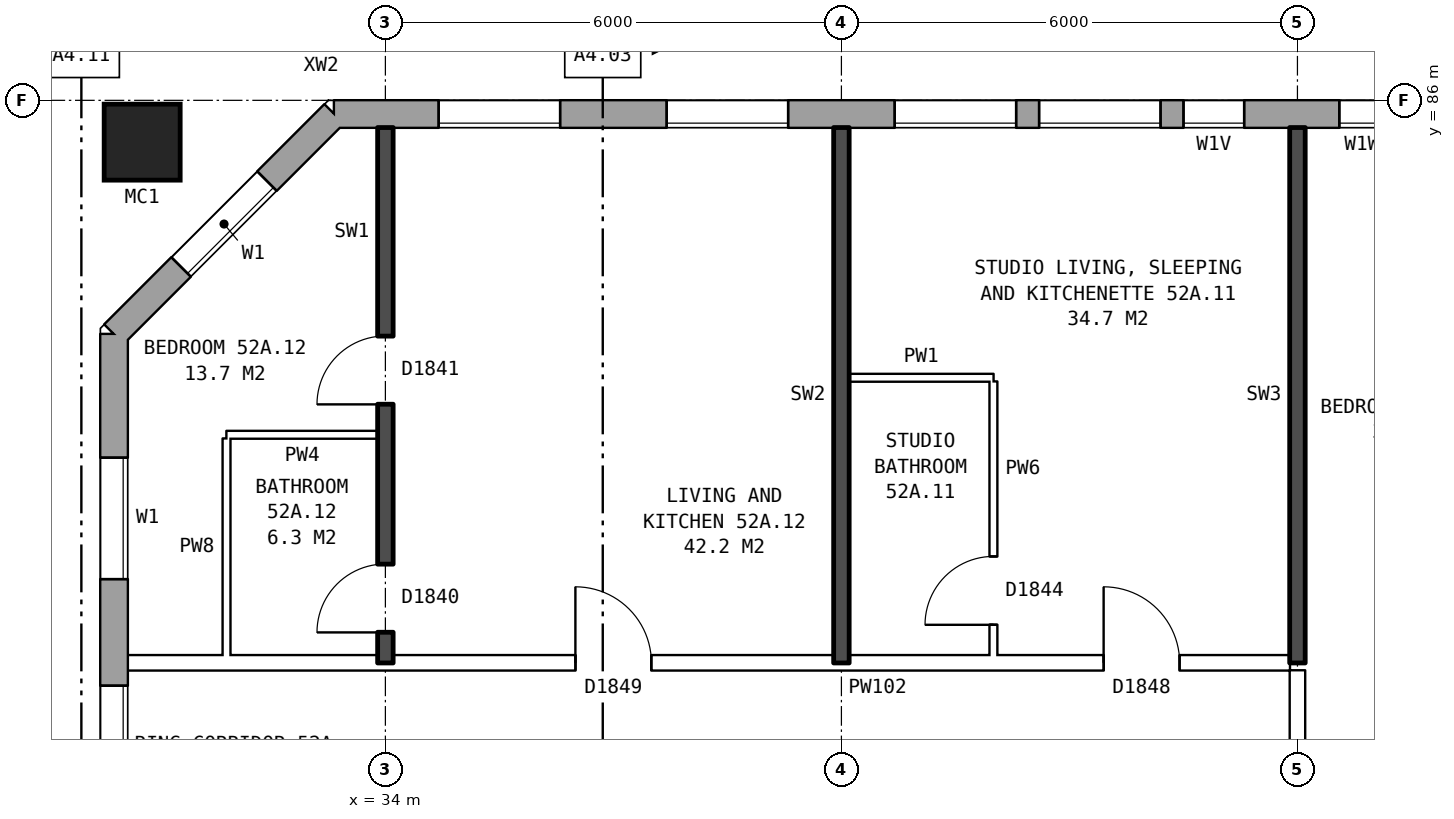
"""IFC4 building model, lengths in metres.
Left out: names, types, materials, properties, quantities, classifications, styles, units other than length and angle.
Written with IfcOpenShell. Run it as: python <this file> out.ifc"""

import sys

from ifc_helpers import new_model, si_unit, direction, frame, frame_2d, origin, origin_2d, place, context, subcontext, project, spatial, rectangle, hollow_rectangle, extrude, element, fill, save


model = new_model("IFC4")
c1 = context("Model", 3, precision=1e-05, world=origin(), true_north=direction((0.0, 1.0)))
c2 = subcontext(c1, "Body", "Model", "MODEL_VIEW")
j1 = project(units=[si_unit("LENGTHUNIT", "METRE"), si_unit("PLANEANGLEUNIT", "RADIAN")], contexts=[c1])
p1 = place(None, origin())
s1 = spatial("IfcSite", under=j1, at=p1, CompositionType="ELEMENT")
p2 = place(p1, origin())
s2 = spatial("IfcBuilding", under=s1, at=p2, CompositionType="ELEMENT")
p3 = place(p2, frame((0.0, 0.0, 185.1)))
s3 = spatial("IfcBuildingStorey", under=s2, at=p3, CompositionType="ELEMENT", Elevation=185.1)
p4 = place(p3, frame((30.8, 85.45, 0.0), z_axis=(0.0, 0.0, 1.0), x_axis=(1.0, 0.0, 0.0)))
e1 = element("IfcColumn", 1, at=p4, inside=s3, PredefinedType="COLUMN", context=c2, shape_type="SweptSolid", body=[
    extrude(hollow_rectangle(XDim=1.0, YDim=1.0, WallThickness=0.055, at=origin_2d()), origin(), (0.0, 0.0, 1.0), 3.1),
])
p5 = place(p3, frame((72.925, 85.82, 0.0), z_axis=(0.0, 0.0, 1.0), x_axis=(-1.0, 0.0, 0.0)))
e2 = element("IfcWall", 2, at=p5, inside=s3, PredefinedType="STANDARD", context=c2, shape_type="SweptSolid", body=[
    extrude(rectangle(XDim=39.601, YDim=0.36, at=frame_2d((19.8, 0.0))), origin(), (0.0, 0.0, 1.0), 2.85),
])
p6 = place(p5, frame((0.625, 0.0, 0.8)))
e3 = element("IfcOpeningElement", 3, at=p6, cuts=e2, PredefinedType="OPENING", context=c2, shape_type="SweptSolid", body=[
    extrude(rectangle(XDim=1.6, YDim=1.8, at=frame_2d((0.8, 0.9))), frame((0.0, 0.19, 0.0), z_axis=(0.0, -1.0, 0.0), x_axis=(1.0, 0.0, 0.0)), (0.0, 0.0, 1.0), 0.38),
])
p7 = place(p5, frame((3.625, 0.0, 0.8)))
e4 = element("IfcOpeningElement", 4, at=p7, cuts=e2, PredefinedType="OPENING", context=c2, shape_type="SweptSolid", body=[
    extrude(rectangle(XDim=1.6, YDim=1.8, at=frame_2d((0.8, 0.9))), frame((0.0, 0.19, 0.0), z_axis=(0.0, -1.0, 0.0), x_axis=(1.0, 0.0, 0.0)), (0.0, 0.0, 1.0), 0.38),
])
p8 = place(p5, frame((6.625, 0.0, 0.8)))
e5 = element("IfcOpeningElement", 5, at=p8, cuts=e2, PredefinedType="OPENING", context=c2, shape_type="SweptSolid", body=[
    extrude(rectangle(XDim=1.6, YDim=1.8, at=frame_2d((0.8, 0.9))), frame((0.0, 0.19, 0.0), z_axis=(0.0, -1.0, 0.0), x_axis=(1.0, 0.0, 0.0)), (0.0, 0.0, 1.0), 0.38),
])
p9 = place(p5, frame((9.625, 0.0, 0.8)))
e6 = element("IfcOpeningElement", 6, at=p9, cuts=e2, PredefinedType="OPENING", context=c2, shape_type="SweptSolid", body=[
    extrude(rectangle(XDim=1.6, YDim=1.8, at=frame_2d((0.8, 0.9))), frame((0.0, 0.19, 0.0), z_axis=(0.0, -1.0, 0.0), x_axis=(1.0, 0.0, 0.0)), (0.0, 0.0, 1.0), 0.38),
])
p10 = place(p5, frame((13.525, 0.0, 0.65)))
e7 = element("IfcOpeningElement", 7, at=p10, cuts=e2, PredefinedType="OPENING", context=c2, shape_type="SweptSolid", body=[
    extrude(rectangle(XDim=1.2, YDim=1.5, at=frame_2d((0.6, 0.75))), frame((0.0, 0.19, 0.0), z_axis=(0.0, -1.0, 0.0), x_axis=(1.0, 0.0, 0.0)), (0.0, 0.0, 1.0), 0.38),
])
p11 = place(p5, frame((15.625, 0.0, 0.8)))
e8 = element("IfcOpeningElement", 8, at=p11, cuts=e2, PredefinedType="OPENING", context=c2, shape_type="SweptSolid", body=[
    extrude(rectangle(XDim=1.6, YDim=1.8, at=frame_2d((0.8, 0.9))), frame((0.0, 0.19, 0.0), z_axis=(0.0, -1.0, 0.0), x_axis=(1.0, 0.0, 0.0)), (0.0, 0.0, 1.0), 0.38),
])
p12 = place(p5, frame((18.625, 0.0, 0.8)))
e9 = element("IfcOpeningElement", 9, at=p12, cuts=e2, PredefinedType="OPENING", context=c2, shape_type="SweptSolid", body=[
    extrude(rectangle(XDim=1.6, YDim=1.8, at=frame_2d((0.8, 0.9))), frame((0.0, 0.19, 0.0), z_axis=(0.0, -1.0, 0.0), x_axis=(1.0, 0.0, 0.0)), (0.0, 0.0, 1.0), 0.38),
])
p13 = place(p5, frame((21.625, 0.0, 0.8)))
e10 = element("IfcOpeningElement", 10, at=p13, cuts=e2, PredefinedType="OPENING", context=c2, shape_type="SweptSolid", body=[
    extrude(rectangle(XDim=1.6, YDim=1.8, at=frame_2d((0.8, 0.9))), frame((0.0, 0.19, 0.0), z_axis=(0.0, -1.0, 0.0), x_axis=(1.0, 0.0, 0.0)), (0.0, 0.0, 1.0), 0.38),
])
p14 = place(p5, frame((24.075, 0.0, 0.8)))
e11 = element("IfcOpeningElement", 11, at=p14, cuts=e2, PredefinedType="OPENING", context=c2, shape_type="SweptSolid", body=[
    extrude(rectangle(XDim=1.4, YDim=1.8, at=frame_2d((0.7, 0.9))), frame((0.0, 0.19, 0.0), z_axis=(0.0, -1.0, 0.0), x_axis=(1.0, 0.0, 0.0)), (0.0, 0.0, 1.0), 0.38),
])
p15 = place(p5, frame((27.625, 0.0, 1.7)))
e12 = element("IfcOpeningElement", 12, at=p15, cuts=e2, PredefinedType="OPENING", context=c2, shape_type="SweptSolid", body=[
    extrude(rectangle(XDim=0.8, YDim=0.9, at=frame_2d((0.4, 0.45))), frame((0.0, 0.19, 0.0), z_axis=(0.0, -1.0, 0.0), x_axis=(1.0, 0.0, 0.0)), (0.0, 0.0, 1.0), 0.38),
])
p16 = place(p5, frame((30.625, 0.0, 0.8)))
e13 = element("IfcOpeningElement", 13, at=p16, cuts=e2, PredefinedType="OPENING", context=c2, shape_type="SweptSolid", body=[
    extrude(rectangle(XDim=1.6, YDim=1.8, at=frame_2d((0.8, 0.9))), frame((0.0, 0.19, 0.0), z_axis=(0.0, -1.0, 0.0), x_axis=(1.0, 0.0, 0.0)), (0.0, 0.0, 1.0), 0.38),
])
p17 = place(p5, frame((33.625, 0.0, 0.8)))
e14 = element("IfcOpeningElement", 14, at=p17, cuts=e2, PredefinedType="OPENING", context=c2, shape_type="SweptSolid", body=[
    extrude(rectangle(XDim=1.6, YDim=1.8, at=frame_2d((0.8, 0.9))), frame((0.0, 0.19, 0.0), z_axis=(0.0, -1.0, 0.0), x_axis=(1.0, 0.0, 0.0)), (0.0, 0.0, 1.0), 0.38),
])
p18 = place(p5, frame((36.625, 0.0, 0.8)))
e15 = element("IfcOpeningElement", 15, at=p18, cuts=e2, PredefinedType="OPENING", context=c2, shape_type="SweptSolid", body=[
    extrude(rectangle(XDim=1.6, YDim=1.8, at=frame_2d((0.8, 0.9))), frame((0.0, 0.19, 0.0), z_axis=(0.0, -1.0, 0.0), x_axis=(1.0, 0.0, 0.0)), (0.0, 0.0, 1.0), 0.38),
])
p19 = place(p5, frame((25.775, 0.0, 0.8)))
e16 = element("IfcOpeningElement", 16, at=p19, cuts=e2, PredefinedType="OPENING", context=c2, shape_type="SweptSolid", body=[
    extrude(rectangle(XDim=0.6, YDim=0.9, at=frame_2d((0.3, 0.45))), frame((0.0, 0.19, 0.0), z_axis=(0.0, -1.0, 0.0), x_axis=(1.0, 0.0, 0.0)), (0.0, 0.0, 1.0), 0.38),
])
p20 = place(p5, frame((28.725, 0.0, 0.8)))
e17 = element("IfcOpeningElement", 17, at=p20, cuts=e2, PredefinedType="OPENING", context=c2, shape_type="SweptSolid", body=[
    extrude(rectangle(XDim=1.6, YDim=1.8, at=frame_2d((0.8, 0.9))), frame((0.0, 0.19, 0.0), z_axis=(0.0, -1.0, 0.0), x_axis=(1.0, 0.0, 0.0)), (0.0, 0.0, 1.0), 0.38),
])
p21 = place(p3, frame((33.325, 85.82, 0.0), z_axis=(0.0, 0.0, 1.0), x_axis=(-0.707106781187, -0.707106781187, 0.0)))
e18 = element("IfcWall", 18, at=p21, inside=s3, PredefinedType="STANDARD", context=c2, shape_type="SweptSolid", body=[
    extrude(rectangle(XDim=4.094, YDim=0.36, at=frame_2d((2.047, 0.0))), origin(), (0.0, 0.0, 1.0), 2.85),
])
p22 = place(p21, frame((1.247, 0.0, 0.8)))
e19 = element("IfcOpeningElement", 19, at=p22, cuts=e18, PredefinedType="OPENING", context=c2, shape_type="SweptSolid", body=[
    extrude(rectangle(XDim=1.6, YDim=1.8, at=frame_2d((0.8, 0.9))), frame((0.0, 0.19, 0.0), z_axis=(0.0, -1.0, 0.0), x_axis=(1.0, 0.0, 0.0)), (0.0, 0.0, 1.0), 0.38),
])
p23 = place(p3, frame((30.43, 82.925, 0.0), z_axis=(0.0, 0.0, 1.0), x_axis=(0.0, -1.0, 0.0)))
e20 = element("IfcWall", 20, at=p23, inside=s3, PredefinedType="STANDARD", context=c2, shape_type="SweptSolid", body=[
    extrude(rectangle(XDim=25.851, YDim=0.36, at=frame_2d((12.925, 0.0))), origin(), (0.0, 0.0, 1.0), 2.85),
])
p24 = place(p23, frame((1.625, 0.0, 0.8)))
e21 = element("IfcOpeningElement", 21, at=p24, cuts=e20, PredefinedType="OPENING", context=c2, shape_type="SweptSolid", body=[
    extrude(rectangle(XDim=1.6, YDim=1.8, at=frame_2d((0.8, 0.9))), frame((0.0, 0.19, 0.0), z_axis=(0.0, -1.0, 0.0), x_axis=(1.0, 0.0, 0.0)), (0.0, 0.0, 1.0), 0.38),
])
p25 = place(p23, frame((4.625, 0.0, 0.8)))
e22 = element("IfcOpeningElement", 22, at=p25, cuts=e20, PredefinedType="OPENING", context=c2, shape_type="SweptSolid", body=[
    extrude(rectangle(XDim=1.6, YDim=1.8, at=frame_2d((0.8, 0.9))), frame((0.0, 0.19, 0.0), z_axis=(0.0, -1.0, 0.0), x_axis=(1.0, 0.0, 0.0)), (0.0, 0.0, 1.0), 0.38),
])
p26 = place(p23, frame((8.025, 0.0, 1.7)))
e23 = element("IfcOpeningElement", 23, at=p26, cuts=e20, PredefinedType="OPENING", context=c2, shape_type="SweptSolid", body=[
    extrude(rectangle(XDim=1.0, YDim=0.9, at=frame_2d((0.5, 0.45))), frame((0.0, 0.19, 0.0), z_axis=(0.0, -1.0, 0.0), x_axis=(1.0, 0.0, 0.0)), (0.0, 0.0, 1.0), 0.38),
])
p27 = place(p23, frame((10.625, 0.0, 0.8)))
e24 = element("IfcOpeningElement", 24, at=p27, cuts=e20, PredefinedType="OPENING", context=c2, shape_type="SweptSolid", body=[
    extrude(rectangle(XDim=1.6, YDim=1.8, at=frame_2d((0.8, 0.9))), frame((0.0, 0.19, 0.0), z_axis=(0.0, -1.0, 0.0), x_axis=(1.0, 0.0, 0.0)), (0.0, 0.0, 1.0), 0.38),
])
p28 = place(p23, frame((13.625, 0.0, 0.8)))
e25 = element("IfcOpeningElement", 25, at=p28, cuts=e20, PredefinedType="OPENING", context=c2, shape_type="SweptSolid", body=[
    extrude(rectangle(XDim=1.6, YDim=1.8, at=frame_2d((0.8, 0.9))), frame((0.0, 0.19, 0.0), z_axis=(0.0, -1.0, 0.0), x_axis=(1.0, 0.0, 0.0)), (0.0, 0.0, 1.0), 0.38),
])
p29 = place(p23, frame((9.325, 0.0, 0.8)))
e26 = element("IfcOpeningElement", 26, at=p29, cuts=e20, PredefinedType="OPENING", context=c2, shape_type="SweptSolid", body=[
    extrude(rectangle(XDim=1.0, YDim=1.8, at=frame_2d((0.5, 0.9))), frame((0.0, 0.19, 0.0), z_axis=(0.0, -1.0, 0.0), x_axis=(1.0, 0.0, 0.0)), (0.0, 0.0, 1.0), 0.38),
])
p30 = place(p23, frame((19.625, 0.0, 0.8)))
e27 = element("IfcOpeningElement", 27, at=p30, cuts=e20, PredefinedType="OPENING", context=c2, shape_type="SweptSolid", body=[
    extrude(rectangle(XDim=1.6, YDim=1.8, at=frame_2d((0.8, 0.9))), frame((0.0, 0.19, 0.0), z_axis=(0.0, -1.0, 0.0), x_axis=(1.0, 0.0, 0.0)), (0.0, 0.0, 1.0), 0.38),
])
p31 = place(p23, frame((22.625, 0.0, 0.8)))
e28 = element("IfcOpeningElement", 28, at=p31, cuts=e20, PredefinedType="OPENING", context=c2, shape_type="SweptSolid", body=[
    extrude(rectangle(XDim=1.6, YDim=1.8, at=frame_2d((0.8, 0.9))), frame((0.0, 0.19, 0.0), z_axis=(0.0, -1.0, 0.0), x_axis=(1.0, 0.0, 0.0)), (0.0, 0.0, 1.0), 0.38),
])
p32 = place(p23, frame((12.525, 0.0, 0.8)))
e29 = element("IfcOpeningElement", 29, at=p32, cuts=e20, PredefinedType="OPENING", context=c2, shape_type="SweptSolid", body=[
    extrude(rectangle(XDim=0.8, YDim=1.8, at=frame_2d((0.4, 0.9))), frame((0.0, 0.19, 0.0), z_axis=(0.0, -1.0, 0.0), x_axis=(1.0, 0.0, 0.0)), (0.0, 0.0, 1.0), 0.38),
])
p33 = place(p23, frame((15.525, 0.0, 0.8)))
e30 = element("IfcOpeningElement", 30, at=p33, cuts=e20, PredefinedType="OPENING", context=c2, shape_type="SweptSolid", body=[
    extrude(rectangle(XDim=1.0, YDim=1.8, at=frame_2d((0.5, 0.9))), frame((0.0, 0.19, 0.0), z_axis=(0.0, -1.0, 0.0), x_axis=(1.0, 0.0, 0.0)), (0.0, 0.0, 1.0), 0.38),
])
p34 = place(p23, frame((16.825, 0.0, 1.7)))
e31 = element("IfcOpeningElement", 31, at=p34, cuts=e20, PredefinedType="OPENING", context=c2, shape_type="SweptSolid", body=[
    extrude(rectangle(XDim=1.0, YDim=0.9, at=frame_2d((0.5, 0.45))), frame((0.0, 0.19, 0.0), z_axis=(0.0, -1.0, 0.0), x_axis=(1.0, 0.0, 0.0)), (0.0, 0.0, 1.0), 0.38),
])
p35 = place(p3, frame((30.61, 78.6, 0.0), z_axis=(0.0, 0.0, 1.0), x_axis=(1.0, 0.0, 0.0)))
e32 = element("IfcWall", 32, at=p35, inside=s3, PredefinedType="PARTITIONING", context=c2, shape_type="SweptSolid", body=[
    extrude(rectangle(XDim=15.29, YDim=0.2, at=frame_2d((7.645, 0.0))), origin(), (0.0, 0.0, 1.0), 2.85),
])
p36 = place(p35, frame((12.84, 0.0, 0.0)))
e33 = element("IfcOpeningElement", 33, at=p36, cuts=e32, PredefinedType="OPENING", context=c2, shape_type="SweptSolid", body=[
    extrude(rectangle(XDim=1.0, YDim=2.1, at=frame_2d((0.5, 1.05))), frame((0.0, 0.11, 0.0), z_axis=(0.0, -1.0, 0.0), x_axis=(1.0, 0.0, 0.0)), (0.0, 0.0, 1.0), 0.22),
])
p37 = place(p35, frame((5.89, 0.0, 0.0)))
e34 = element("IfcOpeningElement", 34, at=p37, cuts=e32, PredefinedType="OPENING", context=c2, shape_type="SweptSolid", body=[
    extrude(rectangle(XDim=1.0, YDim=2.1, at=frame_2d((0.5, 1.05))), frame((0.0, 0.11, 0.0), z_axis=(0.0, -1.0, 0.0), x_axis=(1.0, 0.0, 0.0)), (0.0, 0.0, 1.0), 0.22),
])
p38 = place(p3, frame((31.91, 81.6, 0.0), z_axis=(0.0, 0.0, 1.0), x_axis=(1.0, 0.0, 0.0)))
e35 = element("IfcWall", 35, at=p38, inside=s3, PredefinedType="PARTITIONING", context=c2, shape_type="SweptSolid", body=[
    extrude(rectangle(XDim=1.99, YDim=0.1, at=frame_2d((0.995, 0.0))), origin(), (0.0, 0.0, 1.0), 2.85),
])
p39 = place(p3, frame((40.1, 82.35, 0.0), z_axis=(0.0, 0.0, 1.0), x_axis=(1.0, 0.0, 0.0)))
e36 = element("IfcWall", 36, at=p39, inside=s3, PredefinedType="PARTITIONING", context=c2, shape_type="SweptSolid", body=[
    extrude(rectangle(XDim=1.9, YDim=0.1, at=frame_2d((0.95, 0.0))), origin(), (0.0, 0.0, 1.0), 2.85),
])
p40 = place(p3, frame((31.91, 78.7, 0.0), z_axis=(0.0, 0.0, 1.0), x_axis=(0.0, 1.0, 0.0)))
e37 = element("IfcWall", 37, at=p40, inside=s3, PredefinedType="PARTITIONING", context=c2, shape_type="SweptSolid", body=[
    extrude(rectangle(XDim=2.85, YDim=0.1, at=frame_2d((1.425, 0.0))), origin(), (0.0, 0.0, 1.0), 2.85),
])
p41 = place(p3, frame((34.0, 78.6, 0.0), z_axis=(0.0, 0.0, 1.0), x_axis=(0.0, 1.0, 0.0)))
e38 = element("IfcWall", 38, at=p41, inside=s3, PredefinedType="SOLIDWALL", context=c2, shape_type="SweptSolid", body=[
    extrude(rectangle(XDim=7.04, YDim=0.2, at=frame_2d((3.52, 0.0))), origin(), (0.0, 0.0, 1.0), 2.85),
])
p42 = place(p41, frame((3.4, 0.0, 0.0)))
e39 = element("IfcOpeningElement", 39, at=p42, cuts=e38, PredefinedType="OPENING", context=c2, shape_type="SweptSolid", body=[
    extrude(rectangle(XDim=0.9, YDim=2.1, at=frame_2d((0.45, 1.05))), frame((0.0, 0.11, 0.0), z_axis=(0.0, -1.0, 0.0), x_axis=(1.0, 0.0, 0.0)), (0.0, 0.0, 1.0), 0.22),
])
p43 = place(p41, frame((0.4, 0.0, 0.0)))
e40 = element("IfcOpeningElement", 40, at=p43, cuts=e38, PredefinedType="OPENING", context=c2, shape_type="SweptSolid", body=[
    extrude(rectangle(XDim=0.9, YDim=2.1, at=frame_2d((0.45, 1.05))), frame((0.0, 0.11, 0.0), z_axis=(0.0, -1.0, 0.0), x_axis=(1.0, 0.0, 0.0)), (0.0, 0.0, 1.0), 0.22),
])
p44 = place(p3, frame((40.0, 78.6, 0.0), z_axis=(0.0, 0.0, 1.0), x_axis=(0.0, 1.0, 0.0)))
e41 = element("IfcWall", 41, at=p44, inside=s3, PredefinedType="SOLIDWALL", context=c2, shape_type="SweptSolid", body=[
    extrude(rectangle(XDim=7.04, YDim=0.2, at=frame_2d((3.52, 0.0))), origin(), (0.0, 0.0, 1.0), 2.85),
])
p45 = place(p3, frame((42.0, 78.7, 0.0), z_axis=(0.0, 0.0, 1.0), x_axis=(0.0, 1.0, 0.0)))
e42 = element("IfcWall", 42, at=p45, inside=s3, PredefinedType="PARTITIONING", context=c2, shape_type="SweptSolid", body=[
    extrude(rectangle(XDim=3.6, YDim=0.1, at=frame_2d((1.8, 0.0))), origin(), (0.0, 0.0, 1.0), 2.85),
])
p46 = place(p45, frame((0.4, 0.0, 0.0)))
e43 = element("IfcOpeningElement", 43, at=p46, cuts=e42, PredefinedType="OPENING", context=c2, shape_type="SweptSolid", body=[
    extrude(rectangle(XDim=0.9, YDim=2.1, at=frame_2d((0.45, 1.05))), frame((0.0, 0.06, 0.0), z_axis=(0.0, -1.0, 0.0), x_axis=(1.0, 0.0, 0.0)), (0.0, 0.0, 1.0), 0.12),
])
p47 = place(p3, frame((46.0, 76.3, 0.0), z_axis=(0.0, 0.0, 1.0), x_axis=(0.0, 1.0, 0.0)))
e44 = element("IfcWall", 44, at=p47, inside=s3, PredefinedType="PARTITIONING", context=c2, shape_type="SweptSolid", body=[
    extrude(rectangle(XDim=2.2, YDim=0.2, at=frame_2d((1.1, 0.0))), origin(), (0.0, 0.0, 1.0), 2.85),
])
p48 = place(p3, frame((46.0, 78.6, 0.0), z_axis=(0.0, 0.0, 1.0), x_axis=(0.0, 1.0, 0.0)))
e45 = element("IfcWall", 45, at=p48, inside=s3, PredefinedType="SOLIDWALL", context=c2, shape_type="SweptSolid", body=[
    extrude(rectangle(XDim=7.04, YDim=0.2, at=frame_2d((3.52, 0.0))), origin(), (0.0, 0.0, 1.0), 2.85),
])
p49 = place(p15, origin())
e46 = element("IfcWindow", 46, at=p49, inside=s3, PartitioningType="SINGLE_PANEL", PredefinedType="WINDOW", context=c2, shape_type="SweptSolid", body=[
    extrude(rectangle(XDim=0.8, YDim=0.9, at=frame_2d((0.4, 0.45))), frame((0.0, 0.15, 0.0), z_axis=(0.0, -1.0, 0.0), x_axis=(1.0, 0.0, 0.0)), (0.0, 0.0, 1.0), 0.06),
])
fill(e12, e46)
p50 = place(p16, origin())
e47 = element("IfcWindow", 47, at=p50, inside=s3, PartitioningType="SINGLE_PANEL", PredefinedType="WINDOW", context=c2, shape_type="SweptSolid", body=[
    extrude(rectangle(XDim=1.6, YDim=1.8, at=frame_2d((0.8, 0.9))), frame((0.0, 0.15, 0.0), z_axis=(0.0, -1.0, 0.0), x_axis=(1.0, 0.0, 0.0)), (0.0, 0.0, 1.0), 0.06),
])
fill(e13, e47)
p51 = place(p17, origin())
e48 = element("IfcWindow", 48, at=p51, inside=s3, PartitioningType="SINGLE_PANEL", PredefinedType="WINDOW", context=c2, shape_type="SweptSolid", body=[
    extrude(rectangle(XDim=1.6, YDim=1.8, at=frame_2d((0.8, 0.9))), frame((0.0, 0.15, 0.0), z_axis=(0.0, -1.0, 0.0), x_axis=(1.0, 0.0, 0.0)), (0.0, 0.0, 1.0), 0.06),
])
fill(e14, e48)
p52 = place(p18, origin())
e49 = element("IfcWindow", 49, at=p52, inside=s3, PartitioningType="SINGLE_PANEL", PredefinedType="WINDOW", context=c2, shape_type="SweptSolid", body=[
    extrude(rectangle(XDim=1.6, YDim=1.8, at=frame_2d((0.8, 0.9))), frame((0.0, 0.15, 0.0), z_axis=(0.0, -1.0, 0.0), x_axis=(1.0, 0.0, 0.0)), (0.0, 0.0, 1.0), 0.06),
])
fill(e15, e49)
p53 = place(p22, origin())
e50 = element("IfcWindow", 50, at=p53, inside=s3, PartitioningType="SINGLE_PANEL", PredefinedType="WINDOW", context=c2, shape_type="SweptSolid", body=[
    extrude(rectangle(XDim=1.6, YDim=1.8, at=frame_2d((0.8, 0.9))), frame((0.0, 0.15, 0.0), z_axis=(0.0, -1.0, 0.0), x_axis=(1.0, 0.0, 0.0)), (0.0, 0.0, 1.0), 0.06),
])
fill(e19, e50)
p54 = place(p24, origin())
e51 = element("IfcWindow", 51, at=p54, inside=s3, PartitioningType="SINGLE_PANEL", PredefinedType="WINDOW", context=c2, shape_type="SweptSolid", body=[
    extrude(rectangle(XDim=1.6, YDim=1.8, at=frame_2d((0.8, 0.9))), frame((0.0, 0.15, 0.0), z_axis=(0.0, -1.0, 0.0), x_axis=(1.0, 0.0, 0.0)), (0.0, 0.0, 1.0), 0.06),
])
fill(e21, e51)
p55 = place(p25, origin())
e52 = element("IfcWindow", 52, at=p55, inside=s3, PartitioningType="SINGLE_PANEL", PredefinedType="WINDOW", context=c2, shape_type="SweptSolid", body=[
    extrude(rectangle(XDim=1.6, YDim=1.8, at=frame_2d((0.8, 0.9))), frame((0.0, 0.15, 0.0), z_axis=(0.0, -1.0, 0.0), x_axis=(1.0, 0.0, 0.0)), (0.0, 0.0, 1.0), 0.06),
])
fill(e22, e52)
p56 = place(p36, origin())
e53 = element("IfcDoor", 53, at=p56, inside=s3, OperationType="SINGLE_SWING_LEFT", PredefinedType="DOOR", context=c2, shape_type="SweptSolid", body=[
    extrude(rectangle(XDim=1.0, YDim=2.1, at=frame_2d((0.5, 1.05))), frame((0.0, 0.025, 0.0), z_axis=(0.0, -1.0, 0.0), x_axis=(1.0, 0.0, 0.0)), (0.0, 0.0, 1.0), 0.05),
])
fill(e33, e53)
p57 = place(p46, origin())
e54 = element("IfcDoor", 54, at=p57, inside=s3, OperationType="SINGLE_SWING_LEFT", PredefinedType="DOOR", context=c2, shape_type="SweptSolid", body=[
    extrude(rectangle(XDim=0.9, YDim=2.1, at=frame_2d((0.45, 1.05))), frame((0.0, 0.025, 0.0), z_axis=(0.0, -1.0, 0.0), x_axis=(1.0, 0.0, 0.0)), (0.0, 0.0, 1.0), 0.05),
])
fill(e43, e54)
p58 = place(p42, origin())
e55 = element("IfcDoor", 55, at=p58, inside=s3, OperationType="SINGLE_SWING_LEFT", PredefinedType="DOOR", context=c2, shape_type="SweptSolid", body=[
    extrude(rectangle(XDim=0.9, YDim=2.1, at=frame_2d((0.45, 1.05))), frame((0.0, 0.025, 0.0), z_axis=(0.0, -1.0, 0.0), x_axis=(1.0, 0.0, 0.0)), (0.0, 0.0, 1.0), 0.05),
])
fill(e39, e55)
p59 = place(p37, origin())
e56 = element("IfcDoor", 56, at=p59, inside=s3, OperationType="SINGLE_SWING_LEFT", PredefinedType="DOOR", context=c2, shape_type="SweptSolid", body=[
    extrude(rectangle(XDim=1.0, YDim=2.1, at=frame_2d((0.5, 1.05))), frame((0.0, 0.025, 0.0), z_axis=(0.0, -1.0, 0.0), x_axis=(1.0, 0.0, 0.0)), (0.0, 0.0, 1.0), 0.05),
])
fill(e34, e56)
p60 = place(p43, origin())
e57 = element("IfcDoor", 57, at=p60, inside=s3, OperationType="SINGLE_SWING_LEFT", PredefinedType="DOOR", context=c2, shape_type="SweptSolid", body=[
    extrude(rectangle(XDim=0.9, YDim=2.1, at=frame_2d((0.45, 1.05))), frame((0.0, 0.025, 0.0), z_axis=(0.0, -1.0, 0.0), x_axis=(1.0, 0.0, 0.0)), (0.0, 0.0, 1.0), 0.05),
])
fill(e40, e57)
p61 = place(p19, origin())
e58 = element("IfcWindow", 58, at=p61, inside=s3, PartitioningType="SINGLE_PANEL", PredefinedType="WINDOW", context=c2, shape_type="SweptSolid", body=[
    extrude(rectangle(XDim=0.6, YDim=0.9, at=frame_2d((0.3, 0.45))), frame((0.0, 0.15, 0.0), z_axis=(0.0, -1.0, 0.0), x_axis=(1.0, 0.0, 0.0)), (0.0, 0.0, 1.0), 0.06),
])
fill(e16, e58)
p62 = place(p20, origin())
e59 = element("IfcWindow", 59, at=p62, inside=s3, PartitioningType="SINGLE_PANEL", PredefinedType="WINDOW", context=c2, shape_type="SweptSolid", body=[
    extrude(rectangle(XDim=1.6, YDim=1.8, at=frame_2d((0.8, 0.9))), frame((0.0, 0.15, 0.0), z_axis=(0.0, -1.0, 0.0), x_axis=(1.0, 0.0, 0.0)), (0.0, 0.0, 1.0), 0.06),
])
fill(e17, e59)
save(model, sys.argv[1])
